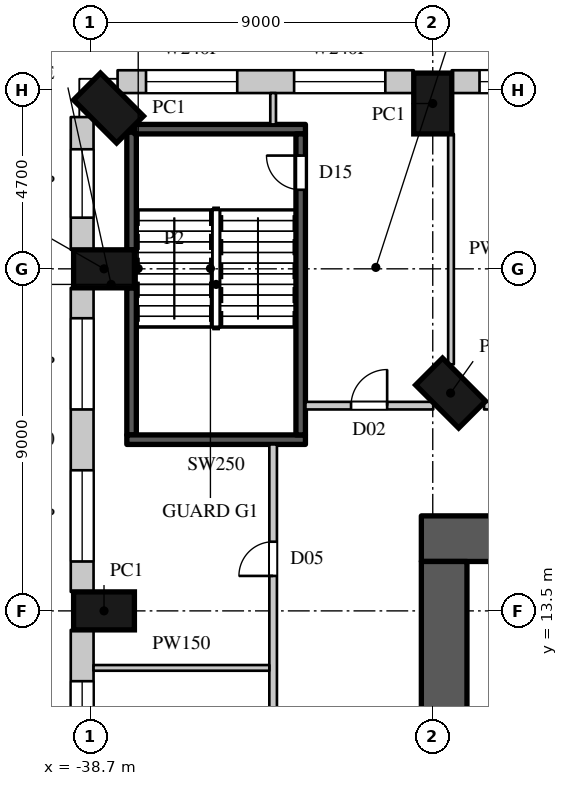
"""IFC4 building model, lengths in metres.
Left out: names, types, materials, properties, quantities, classifications, styles, units other than length and angle.
Written with IfcOpenShell. Run it as: python <this file> out.ifc"""

import sys

from ifc_helpers import new_model, si_unit, direction, frame, frame_2d, origin, origin_2d, place, context, subcontext, project, spatial, rectangle, extrude, element, fill, save


model = new_model("IFC4")
c1 = context("Model", 3, precision=1e-05, world=origin(), true_north=direction((0.0, 1.0)))
c2 = subcontext(c1, "Body", "Model", "MODEL_VIEW")
j1 = project(units=[si_unit("LENGTHUNIT", "METRE"), si_unit("PLANEANGLEUNIT", "RADIAN")], contexts=[c1])
p1 = place(None, origin())
s1 = spatial("IfcSite", under=j1, at=p1, CompositionType="ELEMENT")
p2 = place(p1, origin())
s2 = spatial("IfcBuilding", under=s1, at=p2, CompositionType="ELEMENT")
p3 = place(p2, frame((0.0, 0.0, 36.0)))
s3 = spatial("IfcBuildingStorey", under=s2, at=p3, CompositionType="ELEMENT", Elevation=36.0)
for number, where, z_axis, x_axis in (
    (1, (-29.231, 19.231, 0.0), (0.0, 0.0, 1.0), (-0.707, -0.707, 0.0)),
    (2, (-29.7, 26.85, 0.0), (0.0, 0.0, 1.0), (-1.0, 0.0, 0.0)),
    (3, (-38.231, 26.731, 0.0), (0.0, 0.0, 1.0), (-0.707, -0.707, 0.0)),
    (4, (-38.35, 22.5, 0.0), (0.0, 0.0, 1.0), (0.0, -1.0, 0.0)),
    (5, (-38.35, 13.5, 0.0), (0.0, 0.0, 1.0), (0.0, -1.0, 0.0)),
):
    element("IfcColumn", number, at=place(p3, frame(where, z_axis=z_axis, x_axis=x_axis)), inside=s3, PredefinedType="COLUMN", context=c2, shape_type="SweptSolid", body=[
        extrude(rectangle(XDim=1.0, YDim=1.6, at=origin_2d()), origin(), (0.0, 0.0, 1.0), 8.0),
    ])
p4 = place(p3, frame((24.334, 27.425, 0.0), z_axis=(0.0, 0.0, 1.0), x_axis=(-1.0, 0.0, 0.0)))
e6 = element("IfcWall", 6, at=p4, inside=s3, PredefinedType="ELEMENTEDWALL", context=c2, shape_type="SweptSolid", body=[
    extrude(rectangle(XDim=53.534, YDim=0.6, at=frame_2d((26.767, 0.0))), origin(), (0.0, 0.0, 1.0), 7.6),
])
p5 = place(p4, frame((5.192, 0.0, 1.5)))
e7 = element("IfcOpeningElement", 7, at=p5, cuts=e6, PredefinedType="OPENING", context=c2, shape_type="SweptSolid", body=[
    extrude(rectangle(XDim=3.0, YDim=2.4, at=frame_2d((1.5, 1.2))), frame((0.0, 0.31, 0.0), z_axis=(0.0, -1.0, 0.0), x_axis=(1.0, 0.0, 0.0)), (0.0, 0.0, 1.0), 0.62),
])
p6 = place(p4, frame((14.114, 0.0, 1.5)))
e8 = element("IfcOpeningElement", 8, at=p6, cuts=e6, PredefinedType="OPENING", context=c2, shape_type="SweptSolid", body=[
    extrude(rectangle(XDim=3.0, YDim=2.4, at=frame_2d((1.5, 1.2))), frame((0.0, 0.31, 0.0), z_axis=(0.0, -1.0, 0.0), x_axis=(1.0, 0.0, 0.0)), (0.0, 0.0, 1.0), 0.62),
])
p7 = place(p4, frame((18.575, 0.0, 1.5)))
e9 = element("IfcOpeningElement", 9, at=p7, cuts=e6, PredefinedType="OPENING", context=c2, shape_type="SweptSolid", body=[
    extrude(rectangle(XDim=3.0, YDim=2.4, at=frame_2d((1.5, 1.2))), frame((0.0, 0.31, 0.0), z_axis=(0.0, -1.0, 0.0), x_axis=(1.0, 0.0, 0.0)), (0.0, 0.0, 1.0), 0.62),
])
p8 = place(p4, frame((23.037, 0.0, 1.5)))
e10 = element("IfcOpeningElement", 10, at=p8, cuts=e6, PredefinedType="OPENING", context=c2, shape_type="SweptSolid", body=[
    extrude(rectangle(XDim=3.0, YDim=2.4, at=frame_2d((1.5, 1.2))), frame((0.0, 0.31, 0.0), z_axis=(0.0, -1.0, 0.0), x_axis=(1.0, 0.0, 0.0)), (0.0, 0.0, 1.0), 0.62),
])
p9 = place(p4, frame((27.498, 0.0, 1.5)))
e11 = element("IfcOpeningElement", 11, at=p9, cuts=e6, PredefinedType="OPENING", context=c2, shape_type="SweptSolid", body=[
    extrude(rectangle(XDim=3.0, YDim=2.4, at=frame_2d((1.5, 1.2))), frame((0.0, 0.31, 0.0), z_axis=(0.0, -1.0, 0.0), x_axis=(1.0, 0.0, 0.0)), (0.0, 0.0, 1.0), 0.62),
])
p10 = place(p4, frame((36.42, 0.0, 1.5)))
e12 = element("IfcOpeningElement", 12, at=p10, cuts=e6, PredefinedType="OPENING", context=c2, shape_type="SweptSolid", body=[
    extrude(rectangle(XDim=3.0, YDim=2.4, at=frame_2d((1.5, 1.2))), frame((0.0, 0.31, 0.0), z_axis=(0.0, -1.0, 0.0), x_axis=(1.0, 0.0, 0.0)), (0.0, 0.0, 1.0), 0.62),
])
p11 = place(p4, frame((40.882, 0.0, 1.5)))
e13 = element("IfcOpeningElement", 13, at=p11, cuts=e6, PredefinedType="OPENING", context=c2, shape_type="SweptSolid", body=[
    extrude(rectangle(XDim=3.0, YDim=2.4, at=frame_2d((1.5, 1.2))), frame((0.0, 0.31, 0.0), z_axis=(0.0, -1.0, 0.0), x_axis=(1.0, 0.0, 0.0)), (0.0, 0.0, 1.0), 0.62),
])
p12 = place(p4, frame((45.343, 0.0, 1.5)))
e14 = element("IfcOpeningElement", 14, at=p12, cuts=e6, PredefinedType="OPENING", context=c2, shape_type="SweptSolid", body=[
    extrude(rectangle(XDim=3.0, YDim=2.4, at=frame_2d((1.5, 1.2))), frame((0.0, 0.31, 0.0), z_axis=(0.0, -1.0, 0.0), x_axis=(1.0, 0.0, 0.0)), (0.0, 0.0, 1.0), 0.62),
])
p13 = place(p4, frame((49.804, 0.0, 1.5)))
e15 = element("IfcOpeningElement", 15, at=p13, cuts=e6, PredefinedType="OPENING", context=c2, shape_type="SweptSolid", body=[
    extrude(rectangle(XDim=3.0, YDim=2.4, at=frame_2d((1.5, 1.2))), frame((0.0, 0.31, 0.0), z_axis=(0.0, -1.0, 0.0), x_axis=(1.0, 0.0, 0.0)), (0.0, 0.0, 1.0), 0.62),
])
p14 = place(p4, frame((0.782, 0.0, 1.5)))
e16 = element("IfcOpeningElement", 16, at=p14, cuts=e6, PredefinedType="OPENING", context=c2, shape_type="SweptSolid", body=[
    extrude(rectangle(XDim=1.2, YDim=2.4, at=frame_2d((0.6, 1.2))), frame((0.0, 0.31, 0.0), z_axis=(0.0, -1.0, 0.0), x_axis=(1.0, 0.0, 0.0)), (0.0, 0.0, 1.0), 0.62),
])
p15 = place(p4, frame((2.733, 0.0, 1.5)))
e17 = element("IfcOpeningElement", 17, at=p15, cuts=e6, PredefinedType="OPENING", context=c2, shape_type="SweptSolid", body=[
    extrude(rectangle(XDim=0.9, YDim=2.4, at=frame_2d((0.45, 1.2))), frame((0.0, 0.31, 0.0), z_axis=(0.0, -1.0, 0.0), x_axis=(1.0, 0.0, 0.0)), (0.0, 0.0, 1.0), 0.62),
])
p16 = place(p4, frame((10.194, 0.0, 1.5)))
e18 = element("IfcOpeningElement", 18, at=p16, cuts=e6, PredefinedType="OPENING", context=c2, shape_type="SweptSolid", body=[
    extrude(rectangle(XDim=2.4, YDim=2.4, at=frame_2d((1.2, 1.2))), frame((0.0, 0.31, 0.0), z_axis=(0.0, -1.0, 0.0), x_axis=(1.0, 0.0, 0.0)), (0.0, 0.0, 1.0), 0.62),
])
p17 = place(p4, frame((32.047, 0.0, 1.5)))
e19 = element("IfcOpeningElement", 19, at=p17, cuts=e6, PredefinedType="OPENING", context=c2, shape_type="SweptSolid", body=[
    extrude(rectangle(XDim=2.4, YDim=2.4, at=frame_2d((1.2, 1.2))), frame((0.0, 0.31, 0.0), z_axis=(0.0, -1.0, 0.0), x_axis=(1.0, 0.0, 0.0)), (0.0, 0.0, 1.0), 0.62),
])
p18 = place(p3, frame((-30.2, 27.425, 0.0), z_axis=(0.0, 0.0, 1.0), x_axis=(-1.0, 0.0, 0.0)))
e20 = element("IfcWall", 20, at=p18, inside=s3, PredefinedType="ELEMENTEDWALL", context=c2, shape_type="SweptSolid", body=[
    extrude(rectangle(XDim=7.793, YDim=0.6, at=frame_2d((3.896, 0.0))), origin(), (0.0, 0.0, 1.0), 7.6),
])
p19 = place(p18, frame((0.748, 0.0, 1.5)))
e21 = element("IfcOpeningElement", 21, at=p19, cuts=e20, PredefinedType="OPENING", context=c2, shape_type="SweptSolid", body=[
    extrude(rectangle(XDim=2.4, YDim=2.4, at=frame_2d((1.2, 1.2))), frame((0.0, 0.31, 0.0), z_axis=(0.0, -1.0, 0.0), x_axis=(1.0, 0.0, 0.0)), (0.0, 0.0, 1.0), 0.62),
])
p20 = place(p18, frame((4.645, 0.0, 1.5)))
e22 = element("IfcOpeningElement", 22, at=p20, cuts=e20, PredefinedType="OPENING", context=c2, shape_type="SweptSolid", body=[
    extrude(rectangle(XDim=2.4, YDim=2.4, at=frame_2d((1.2, 1.2))), frame((0.0, 0.31, 0.0), z_axis=(0.0, -1.0, 0.0), x_axis=(1.0, 0.0, 0.0)), (0.0, 0.0, 1.0), 0.62),
])
p21 = place(p3, frame((-38.925, 26.493, 0.0), z_axis=(0.0, 0.0, 1.0), x_axis=(0.0, -1.0, 0.0)))
e23 = element("IfcWall", 23, at=p21, inside=s3, PredefinedType="ELEMENTEDWALL", context=c2, shape_type="SweptSolid", body=[
    extrude(rectangle(XDim=3.493, YDim=0.6, at=frame_2d((1.747, 0.0))), origin(), (0.0, 0.0, 1.0), 7.6),
])
p22 = place(p21, frame((0.846, 0.0, 1.5)))
e24 = element("IfcOpeningElement", 24, at=p22, cuts=e23, PredefinedType="OPENING", context=c2, shape_type="SweptSolid", body=[
    extrude(rectangle(XDim=1.8, YDim=2.4, at=frame_2d((0.9, 1.2))), frame((0.0, 0.31, 0.0), z_axis=(0.0, -1.0, 0.0), x_axis=(1.0, 0.0, 0.0)), (0.0, 0.0, 1.0), 0.62),
])
p23 = place(p3, frame((-38.925, 22.0, 0.0), z_axis=(0.0, 0.0, 1.0), x_axis=(0.0, -1.0, 0.0)))
e25 = element("IfcWall", 25, at=p23, inside=s3, PredefinedType="ELEMENTEDWALL", context=c2, shape_type="SweptSolid", body=[
    extrude(rectangle(XDim=8.0, YDim=0.6, at=frame_2d((4.0, 0.0))), origin(), (0.0, 0.0, 1.0), 7.6),
])
p24 = place(p23, frame((0.8, 0.0, 1.5)))
e26 = element("IfcOpeningElement", 26, at=p24, cuts=e25, PredefinedType="OPENING", context=c2, shape_type="SweptSolid", body=[
    extrude(rectangle(XDim=2.4, YDim=2.4, at=frame_2d((1.2, 1.2))), frame((0.0, 0.31, 0.0), z_axis=(0.0, -1.0, 0.0), x_axis=(1.0, 0.0, 0.0)), (0.0, 0.0, 1.0), 0.62),
])
p25 = place(p23, frame((4.8, 0.0, 1.5)))
e27 = element("IfcOpeningElement", 27, at=p25, cuts=e25, PredefinedType="OPENING", context=c2, shape_type="SweptSolid", body=[
    extrude(rectangle(XDim=2.4, YDim=2.4, at=frame_2d((1.2, 1.2))), frame((0.0, 0.31, 0.0), z_axis=(0.0, -1.0, 0.0), x_axis=(1.0, 0.0, 0.0)), (0.0, 0.0, 1.0), 0.62),
])
p26 = place(p3, frame((-38.925, 13.0, 0.0), z_axis=(0.0, 0.0, 1.0), x_axis=(0.0, -1.0, 0.0)))
e28 = element("IfcWall", 28, at=p26, inside=s3, PredefinedType="ELEMENTEDWALL", context=c2, shape_type="SweptSolid", body=[
    extrude(rectangle(XDim=8.0, YDim=0.6, at=frame_2d((4.0, 0.0))), origin(), (0.0, 0.0, 1.0), 7.6),
])
p27 = place(p26, frame((1.35, 0.0, 1.5)))
e29 = element("IfcOpeningElement", 29, at=p27, cuts=e28, PredefinedType="OPENING", context=c2, shape_type="SweptSolid", body=[
    extrude(rectangle(XDim=1.8, YDim=2.4, at=frame_2d((0.9, 1.2))), frame((0.0, 0.31, 0.0), z_axis=(0.0, -1.0, 0.0), x_axis=(1.0, 0.0, 0.0)), (0.0, 0.0, 1.0), 0.62),
])
p28 = place(p26, frame((5.9, 0.0, 1.5)))
e30 = element("IfcOpeningElement", 30, at=p28, cuts=e28, PredefinedType="OPENING", context=c2, shape_type="SweptSolid", body=[
    extrude(rectangle(XDim=1.2, YDim=2.4, at=frame_2d((0.6, 1.2))), frame((0.0, 0.31, 0.0), z_axis=(0.0, -1.0, 0.0), x_axis=(1.0, 0.0, 0.0)), (0.0, 0.0, 1.0), 0.62),
])
p29 = place(p3, frame((-30.0, 15.4, 0.0), z_axis=(0.0, 0.0, 1.0), x_axis=(1.0, 0.0, 0.0)))
e31 = element("IfcWall", 31, at=p29, inside=s3, PredefinedType="SHEAR", context=c2, shape_type="SweptSolid", body=[
    extrude(rectangle(XDim=16.0, YDim=1.2, at=frame_2d((8.0, 0.0))), origin(), (0.0, 0.0, 1.0), 8.0),
])
p30 = place(p3, frame((-29.4, 10.2, 0.0), z_axis=(0.0, 0.0, 1.0), x_axis=(0.0, 1.0, 0.0)))
e32 = element("IfcWall", 32, at=p30, inside=s3, PredefinedType="SHEAR", context=c2, shape_type="SweptSolid", body=[
    extrude(rectangle(XDim=4.6, YDim=1.2, at=frame_2d((2.3, 0.0))), origin(), (0.0, 0.0, 1.0), 8.0),
])
p31 = place(p3, frame((-33.9, -17.88, 0.0), z_axis=(0.0, 0.0, 1.0), x_axis=(0.0, 1.0, 0.0)))
e33 = element("IfcWall", 33, at=p31, inside=s3, PredefinedType="PARTITIONING", context=c2, shape_type="SweptSolid", body=[
    extrude(rectangle(XDim=35.76, YDim=0.2, at=frame_2d((17.88, 0.0))), origin(), (0.0, 0.0, 1.0), 7.598),
])
p32 = place(p31, frame((2.55, 0.0, 0.0)))
e34 = element("IfcOpeningElement", 34, at=p32, cuts=e33, PredefinedType="OPENING", context=c2, shape_type="SweptSolid", body=[
    extrude(rectangle(XDim=0.9, YDim=2.2, at=frame_2d((0.45, 1.1))), frame((0.0, 0.11, 0.0), z_axis=(0.0, -1.0, 0.0), x_axis=(1.0, 0.0, 0.0)), (0.0, 0.0, 1.0), 0.22),
])
p33 = place(p31, frame((9.4, 0.0, 0.0)))
e35 = element("IfcOpeningElement", 35, at=p33, cuts=e33, PredefinedType="OPENING", context=c2, shape_type="SweptSolid", body=[
    extrude(rectangle(XDim=0.9, YDim=2.2, at=frame_2d((0.45, 1.1))), frame((0.0, 0.11, 0.0), z_axis=(0.0, -1.0, 0.0), x_axis=(1.0, 0.0, 0.0)), (0.0, 0.0, 1.0), 0.22),
])
p34 = place(p31, frame((16.95, 0.0, 0.0)))
e36 = element("IfcOpeningElement", 36, at=p34, cuts=e33, PredefinedType="OPENING", context=c2, shape_type="SweptSolid", body=[
    extrude(rectangle(XDim=0.9, YDim=2.2, at=frame_2d((0.45, 1.1))), frame((0.0, 0.11, 0.0), z_axis=(0.0, -1.0, 0.0), x_axis=(1.0, 0.0, 0.0)), (0.0, 0.0, 1.0), 0.22),
])
p35 = place(p31, frame((22.65, 0.0, 0.0)))
e37 = element("IfcOpeningElement", 37, at=p35, cuts=e33, PredefinedType="OPENING", context=c2, shape_type="SweptSolid", body=[
    extrude(rectangle(XDim=0.9, YDim=2.2, at=frame_2d((0.45, 1.1))), frame((0.0, 0.11, 0.0), z_axis=(0.0, -1.0, 0.0), x_axis=(1.0, 0.0, 0.0)), (0.0, 0.0, 1.0), 0.22),
])
p36 = place(p31, frame((27.15, 0.0, 0.0)))
e38 = element("IfcOpeningElement", 38, at=p36, cuts=e33, PredefinedType="OPENING", context=c2, shape_type="SweptSolid", body=[
    extrude(rectangle(XDim=0.9, YDim=2.2, at=frame_2d((0.45, 1.1))), frame((0.0, 0.11, 0.0), z_axis=(0.0, -1.0, 0.0), x_axis=(1.0, 0.0, 0.0)), (0.0, 0.0, 1.0), 0.22),
])
p37 = place(p31, frame((32.3, 0.0, 0.0)))
e39 = element("IfcOpeningElement", 39, at=p37, cuts=e33, PredefinedType="OPENING", context=c2, shape_type="SweptSolid", body=[
    extrude(rectangle(XDim=0.9, YDim=2.2, at=frame_2d((0.45, 1.1))), frame((0.0, 0.11, 0.0), z_axis=(0.0, -1.0, 0.0), x_axis=(1.0, 0.0, 0.0)), (0.0, 0.0, 1.0), 0.22),
])
p38 = place(p3, frame((-33.05, 18.9, 0.0), z_axis=(0.0, 0.0, 1.0), x_axis=(1.0, 0.0, 0.0)))
e40 = element("IfcWall", 40, at=p38, inside=s3, PredefinedType="PARTITIONING", context=c2, shape_type="SweptSolid", body=[
    extrude(rectangle(XDim=3.363, YDim=0.2, at=frame_2d((1.682, 0.0))), origin(), (0.0, 0.0, 1.0), 7.598),
])
p39 = place(p38, frame((1.2, 0.0, 0.0)))
e41 = element("IfcOpeningElement", 41, at=p39, cuts=e40, PredefinedType="OPENING", context=c2, shape_type="SweptSolid", body=[
    extrude(rectangle(XDim=0.95, YDim=2.2, at=frame_2d((0.475, 1.1))), frame((0.0, 0.11, 0.0), z_axis=(0.0, -1.0, 0.0), x_axis=(1.0, 0.0, 0.0)), (0.0, 0.0, 1.0), 0.22),
])
p40 = place(p3, frame((-28.35, 18.9, 0.0), z_axis=(0.0, 0.0, 1.0), x_axis=(1.0, 0.0, 0.0)))
e42 = element("IfcWall", 42, at=p40, inside=s3, PredefinedType="PARTITIONING", context=c2, shape_type="SweptSolid", body=[
    extrude(rectangle(XDim=3.244, YDim=0.2, at=frame_2d((1.622, 0.0))), origin(), (0.0, 0.0, 1.0), 7.598),
])
p41 = place(p40, frame((1.1, 0.0, 0.0)))
e43 = element("IfcOpeningElement", 43, at=p41, cuts=e42, PredefinedType="OPENING", context=c2, shape_type="SweptSolid", body=[
    extrude(rectangle(XDim=0.95, YDim=2.2, at=frame_2d((0.475, 1.1))), frame((0.0, 0.11, 0.0), z_axis=(0.0, -1.0, 0.0), x_axis=(1.0, 0.0, 0.0)), (0.0, 0.0, 1.0), 0.22),
])
p42 = place(p3, frame((-38.625, 12.0, 0.0), z_axis=(0.0, 0.0, 1.0), x_axis=(1.0, 0.0, 0.0)))
e44 = element("IfcWall", 44, at=p42, inside=s3, PredefinedType="PARTITIONING", context=c2, shape_type="SweptSolid", body=[
    extrude(rectangle(XDim=4.625, YDim=0.15, at=frame_2d((2.312, 0.0))), origin(), (0.0, 0.0, 1.0), 7.598),
])
p43 = place(p3, frame((-33.9, 26.3, 0.0), z_axis=(0.0, 0.0, 1.0), x_axis=(0.0, 1.0, 0.0)))
e45 = element("IfcWall", 45, at=p43, inside=s3, PredefinedType="PARTITIONING", context=c2, shape_type="SweptSolid", body=[
    extrude(rectangle(XDim=0.825, YDim=0.15, at=frame_2d((0.413, 0.0))), origin(), (0.0, 0.0, 1.0), 7.598),
])
p44 = place(p3, frame((-29.22, 19.987, 0.0), z_axis=(0.0, 0.0, 1.0), x_axis=(0.0, 1.0, 0.0)))
e46 = element("IfcWall", 46, at=p44, inside=s3, PredefinedType="PARTITIONING", context=c2, shape_type="SweptSolid", body=[
    extrude(rectangle(XDim=6.063, YDim=0.15, at=frame_2d((3.031, 0.0))), origin(), (0.0, 0.0, 1.0), 7.598),
])
p45 = place(p3, frame((-37.625, 18.13, 0.0), z_axis=(0.0, 0.0, 1.0), x_axis=(0.0, 1.0, 0.0)))
e47 = element("IfcWall", 47, at=p45, inside=s3, PredefinedType="SHEAR", context=c2, shape_type="SweptSolid", body=[
    extrude(rectangle(XDim=3.87, YDim=0.25, at=frame_2d((1.935, 0.0))), origin(), (0.0, 0.0, 1.0), 7.6),
])
p46 = place(p3, frame((-37.625, 23.0, 0.0), z_axis=(0.0, 0.0, 1.0), x_axis=(0.0, 1.0, 0.0)))
e48 = element("IfcWall", 48, at=p46, inside=s3, PredefinedType="SHEAR", context=c2, shape_type="SweptSolid", body=[
    extrude(rectangle(XDim=3.095, YDim=0.25, at=frame_2d((1.548, 0.0))), origin(), (0.0, 0.0, 1.0), 7.6),
])
p47 = place(p3, frame((-37.75, 18.005, 0.0), z_axis=(0.0, 0.0, 1.0), x_axis=(1.0, 0.0, 0.0)))
e49 = element("IfcWall", 49, at=p47, inside=s3, PredefinedType="SHEAR", context=c2, shape_type="SweptSolid", body=[
    extrude(rectangle(XDim=4.7, YDim=0.25, at=frame_2d((2.35, 0.0))), origin(), (0.0, 0.0, 1.0), 7.6),
])
p48 = place(p3, frame((-37.545, 26.175, 0.0), z_axis=(0.0, 0.0, 1.0), x_axis=(1.0, 0.0, 0.0)))
e50 = element("IfcWall", 50, at=p48, inside=s3, PredefinedType="SHEAR", context=c2, shape_type="SweptSolid", body=[
    extrude(rectangle(XDim=4.495, YDim=0.25, at=frame_2d((2.248, 0.0))), origin(), (0.0, 0.0, 1.0), 7.6),
])
p49 = place(p3, frame((-33.175, 18.13, 0.0), z_axis=(0.0, 0.0, 1.0), x_axis=(0.0, 1.0, 0.0)))
e51 = element("IfcWall", 51, at=p49, inside=s3, PredefinedType="SHEAR", context=c2, shape_type="SweptSolid", body=[
    extrude(rectangle(XDim=7.92, YDim=0.25, at=frame_2d((3.96, 0.0))), origin(), (0.0, 0.0, 1.0), 7.6),
])
p50 = place(p49, frame((6.45, 0.0, 0.0)))
e52 = element("IfcOpeningElement", 52, at=p50, cuts=e51, PredefinedType="OPENING", context=c2, shape_type="SweptSolid", body=[
    extrude(rectangle(XDim=0.9, YDim=2.2, at=frame_2d((0.45, 1.1))), frame((0.0, 0.135, 0.0), z_axis=(0.0, -1.0, 0.0), x_axis=(1.0, 0.0, 0.0)), (0.0, 0.0, 1.0), 0.27),
])
p51 = place(p13, origin())
e53 = element("IfcWindow", 53, at=p51, inside=s3, PartitioningType="SINGLE_PANEL", PredefinedType="WINDOW", context=c2, shape_type="SweptSolid", body=[
    extrude(rectangle(XDim=3.0, YDim=2.4, at=frame_2d((1.5, 1.2))), frame((0.0, 0.06, 0.0), z_axis=(0.0, -1.0, 0.0), x_axis=(1.0, 0.0, 0.0)), (0.0, 0.0, 1.0), 0.06),
])
fill(e15, e53)
p52 = place(p19, origin())
e54 = element("IfcWindow", 54, at=p52, inside=s3, PartitioningType="SINGLE_PANEL", PredefinedType="WINDOW", context=c2, shape_type="SweptSolid", body=[
    extrude(rectangle(XDim=2.4, YDim=2.4, at=frame_2d((1.2, 1.2))), frame((0.0, 0.06, 0.0), z_axis=(0.0, -1.0, 0.0), x_axis=(1.0, 0.0, 0.0)), (0.0, 0.0, 1.0), 0.06),
])
fill(e21, e54)
p53 = place(p20, origin())
e55 = element("IfcWindow", 55, at=p53, inside=s3, PartitioningType="SINGLE_PANEL", PredefinedType="WINDOW", context=c2, shape_type="SweptSolid", body=[
    extrude(rectangle(XDim=2.4, YDim=2.4, at=frame_2d((1.2, 1.2))), frame((0.0, 0.06, 0.0), z_axis=(0.0, -1.0, 0.0), x_axis=(1.0, 0.0, 0.0)), (0.0, 0.0, 1.0), 0.06),
])
fill(e22, e55)
p54 = place(p22, origin())
e56 = element("IfcWindow", 56, at=p54, inside=s3, PartitioningType="SINGLE_PANEL", PredefinedType="WINDOW", context=c2, shape_type="SweptSolid", body=[
    extrude(rectangle(XDim=1.8, YDim=2.4, at=frame_2d((0.9, 1.2))), frame((0.0, 0.06, 0.0), z_axis=(0.0, -1.0, 0.0), x_axis=(1.0, 0.0, 0.0)), (0.0, 0.0, 1.0), 0.06),
])
fill(e24, e56)
p55 = place(p24, origin())
e57 = element("IfcWindow", 57, at=p55, inside=s3, PartitioningType="SINGLE_PANEL", PredefinedType="WINDOW", context=c2, shape_type="SweptSolid", body=[
    extrude(rectangle(XDim=2.4, YDim=2.4, at=frame_2d((1.2, 1.2))), frame((0.0, 0.06, 0.0), z_axis=(0.0, -1.0, 0.0), x_axis=(1.0, 0.0, 0.0)), (0.0, 0.0, 1.0), 0.06),
])
fill(e26, e57)
p56 = place(p25, origin())
e58 = element("IfcWindow", 58, at=p56, inside=s3, PartitioningType="SINGLE_PANEL", PredefinedType="WINDOW", context=c2, shape_type="SweptSolid", body=[
    extrude(rectangle(XDim=2.4, YDim=2.4, at=frame_2d((1.2, 1.2))), frame((0.0, 0.06, 0.0), z_axis=(0.0, -1.0, 0.0), x_axis=(1.0, 0.0, 0.0)), (0.0, 0.0, 1.0), 0.06),
])
fill(e27, e58)
p57 = place(p37, origin())
e59 = element("IfcDoor", 59, at=p57, inside=s3, OperationType="SINGLE_SWING_LEFT", PredefinedType="DOOR", context=c2, shape_type="SweptSolid", body=[
    extrude(rectangle(XDim=0.9, YDim=2.2, at=frame_2d((0.45, 1.1))), frame((0.0, 0.025, 0.0), z_axis=(0.0, -1.0, 0.0), x_axis=(1.0, 0.0, 0.0)), (0.0, 0.0, 1.0), 0.05),
])
fill(e39, e59)
p58 = place(p39, origin())
e60 = element("IfcDoor", 60, at=p58, inside=s3, OperationType="SINGLE_SWING_RIGHT", PredefinedType="DOOR", context=c2, shape_type="SweptSolid", body=[
    extrude(rectangle(XDim=0.95, YDim=2.2, at=frame_2d((0.475, 1.1))), frame((0.0, 0.025, 0.0), z_axis=(0.0, -1.0, 0.0), x_axis=(1.0, 0.0, 0.0)), (0.0, 0.0, 1.0), 0.05),
])
fill(e41, e60)
p59 = place(p50, origin())
e61 = element("IfcDoor", 61, at=p59, inside=s3, OperationType="SINGLE_SWING_RIGHT", PredefinedType="DOOR", context=c2, shape_type="SweptSolid", body=[
    extrude(rectangle(XDim=0.9, YDim=2.2, at=frame_2d((0.45, 1.1))), frame((0.0, 0.025, 0.0), z_axis=(0.0, -1.0, 0.0), x_axis=(1.0, 0.0, 0.0)), (0.0, 0.0, 1.0), 0.05),
])
fill(e52, e61)
p60 = place(p27, origin())
e62 = element("IfcWindow", 62, at=p60, inside=s3, PartitioningType="SINGLE_PANEL", PredefinedType="WINDOW", context=c2, shape_type="SweptSolid", body=[
    extrude(rectangle(XDim=1.8, YDim=2.4, at=frame_2d((0.9, 1.2))), frame((0.0, 0.06, 0.0), z_axis=(0.0, -1.0, 0.0), x_axis=(1.0, 0.0, 0.0)), (0.0, 0.0, 1.0), 0.06),
])
fill(e29, e62)
save(model, sys.argv[1])
